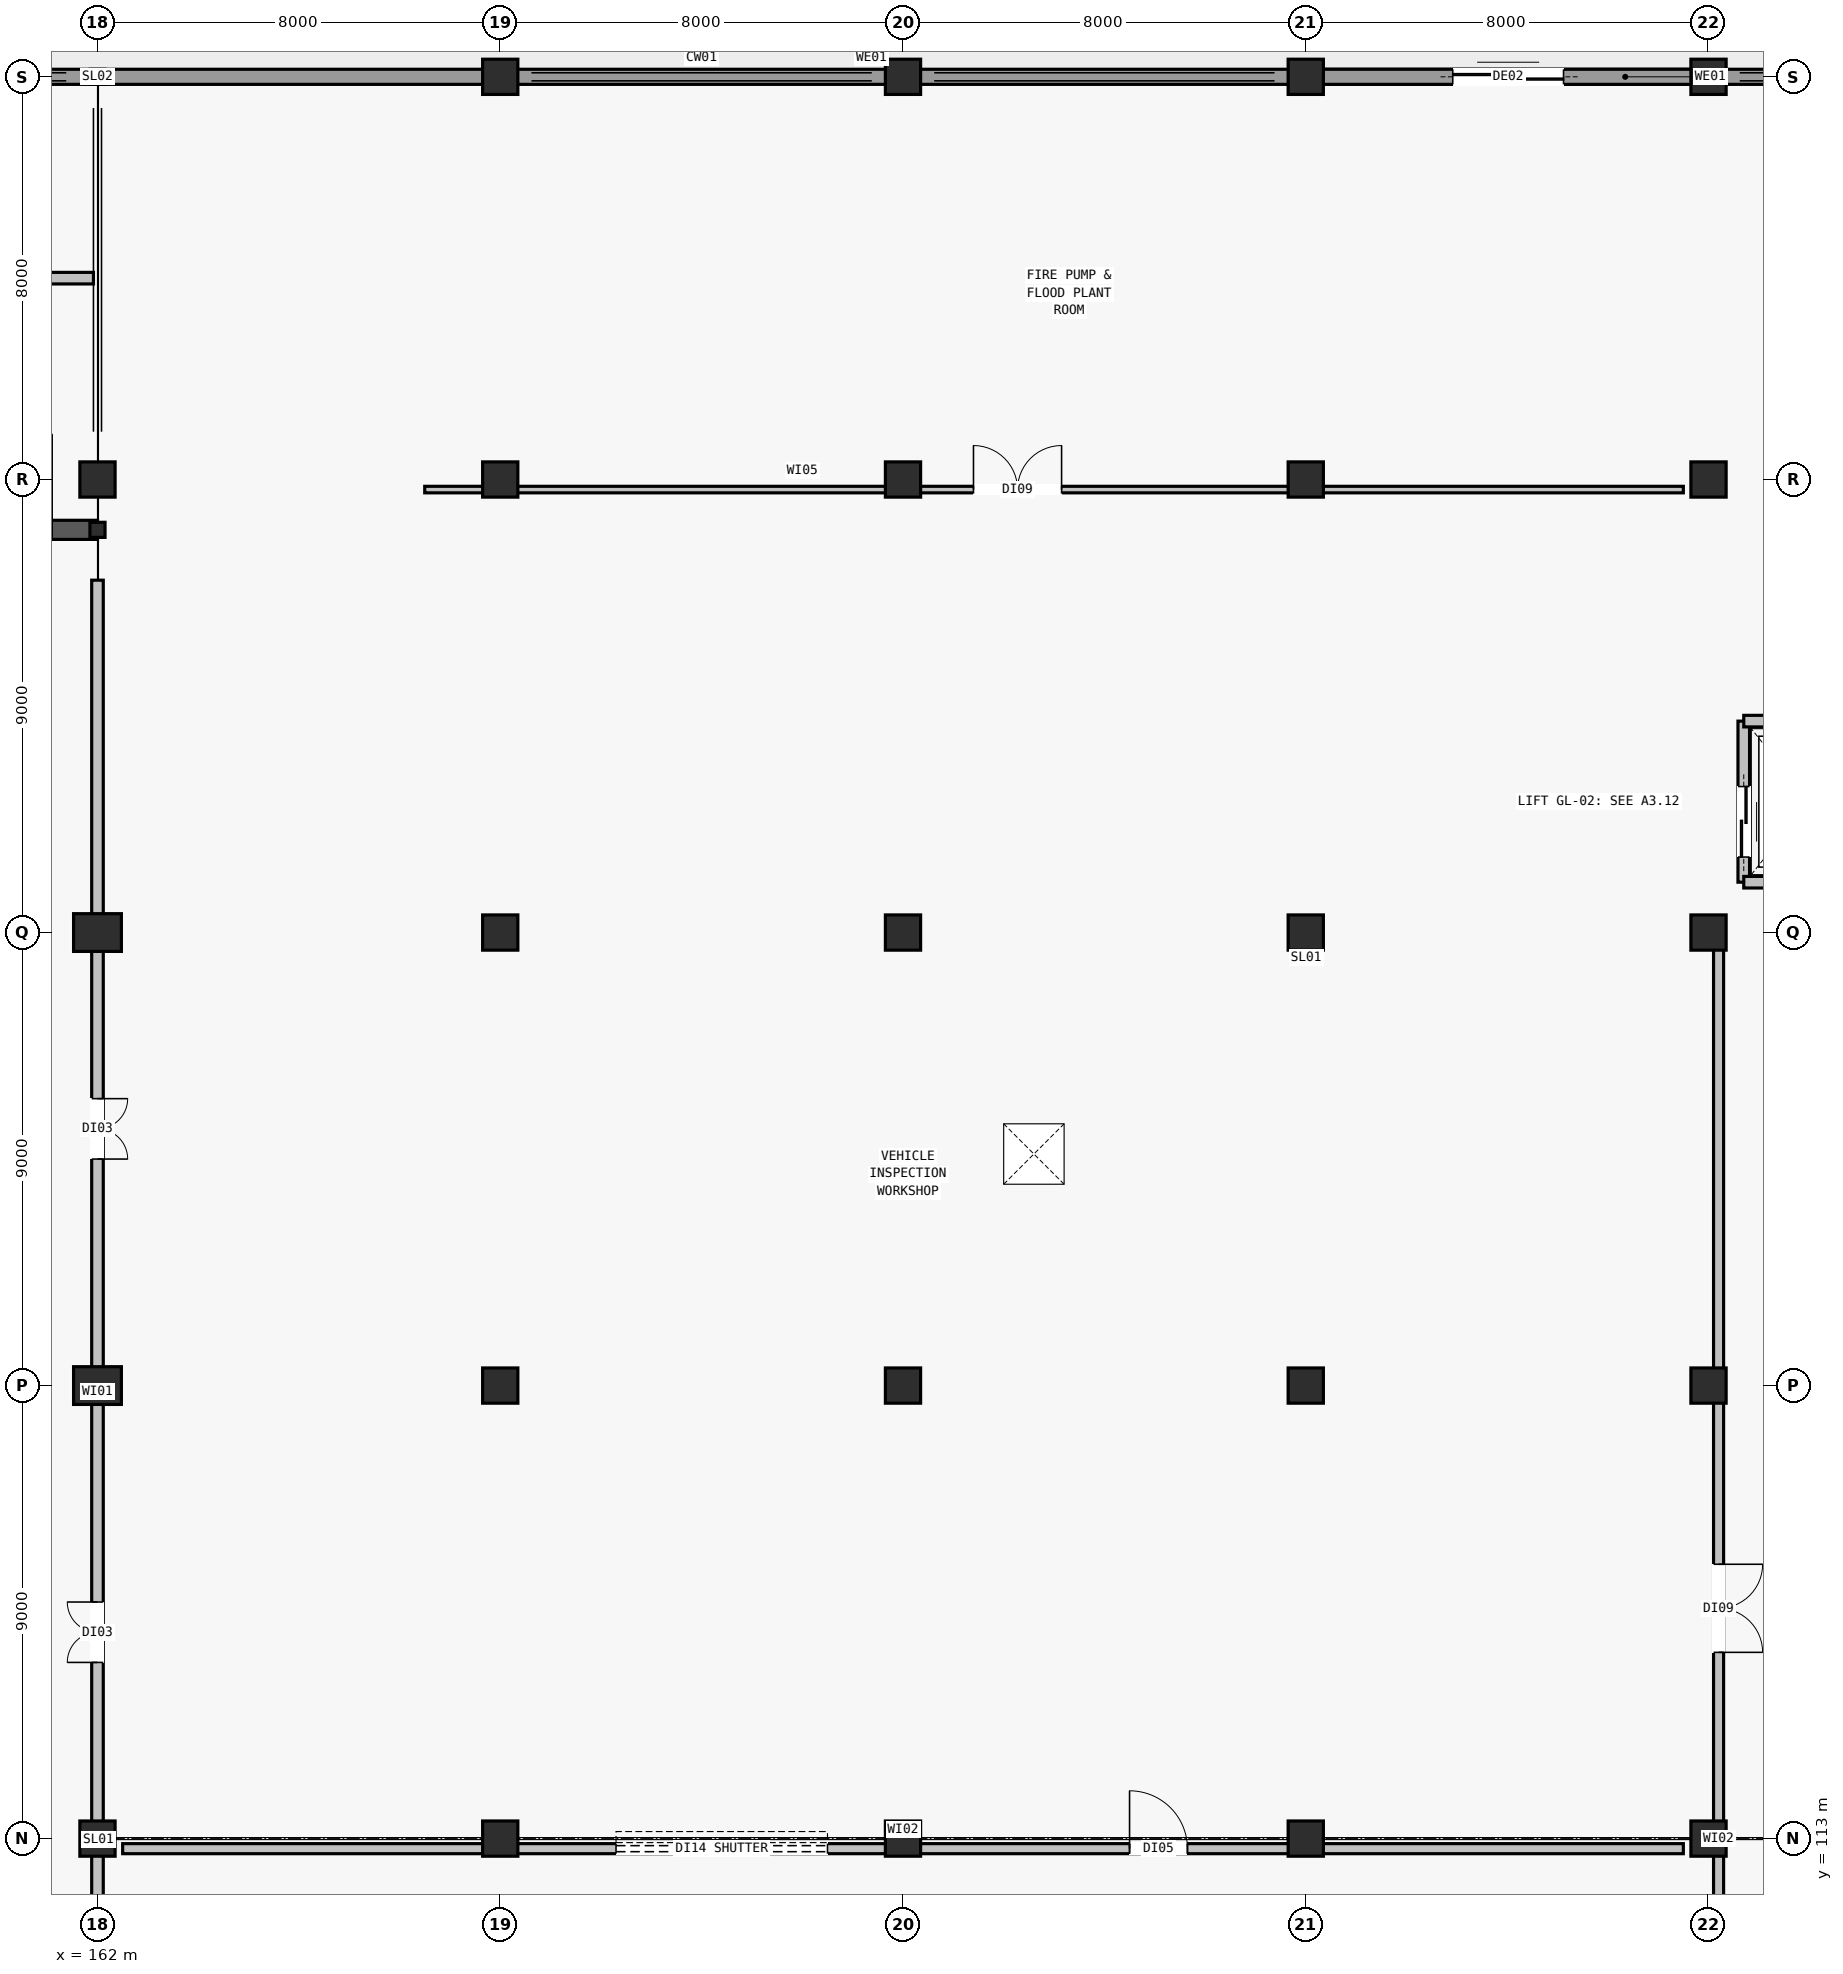
"""IFC4 building model, lengths in metres.
Left out: names, types, materials, properties, quantities, classifications, styles, units other than length and angle.
Written with IfcOpenShell. Run it as: python <this file> out.ifc"""

import sys

from ifc_helpers import new_model, si_unit, direction, frame, frame_2d, origin, origin_2d, place, context, subcontext, project, spatial, rectangle, i_section, extrude, element, fill, save


model = new_model("IFC4")
c1 = context("Model", 3, precision=1e-05, world=origin(), true_north=direction((0.0, 1.0)))
c2 = subcontext(c1, "Body", "Model", "MODEL_VIEW")
j1 = project(units=[si_unit("LENGTHUNIT", "METRE"), si_unit("PLANEANGLEUNIT", "RADIAN")], contexts=[c1])
p1 = place(None, origin())
s1 = spatial("IfcSite", under=j1, at=p1, CompositionType="ELEMENT")
p2 = place(p1, origin())
s2 = spatial("IfcBuilding", under=s1, at=p2, CompositionType="ELEMENT")
p3 = place(p2, origin())
s3 = spatial("IfcBuildingStorey", under=s2, at=p3, CompositionType="ELEMENT", Elevation=0.0)
for number, where, z_axis, x_axis in (
    (1, (162.0, 148.0, -0.9), (0.0, 0.0, 1.0), (1.0, 0.0, 0.0)),
    (2, (162.0, 139.0, -0.9), (0.0, 0.0, 1.0), (1.0, 0.0, 0.0)),
):
    element("IfcColumn", number, at=place(p3, frame(where, z_axis=z_axis, x_axis=x_axis)), inside=s3, PredefinedType="COLUMN", context=c2, shape_type="SweptSolid", body=[
        extrude(i_section(OverallWidth=0.3, OverallDepth=0.3, WebThickness=0.01, FlangeThickness=0.015, FilletRadius=0.018, at=origin_2d()), origin(), (0.0, 0.0, 1.0), 6.5),
    ])
for number, where, z_axis, x_axis in (
    (3, (162.0, 122.0, -0.9), (0.0, 0.0, 1.0), (1.0, 0.0, 0.0)),
    (4, (162.0, 131.0, -0.9), (0.0, 0.0, 1.0), (1.0, 0.0, 0.0)),
):
    element("IfcColumn", number, at=place(p3, frame(where, z_axis=z_axis, x_axis=x_axis)), inside=s3, PredefinedType="COLUMN", context=c2, shape_type="SweptSolid", body=[
        extrude(rectangle(XDim=0.95, YDim=0.75, at=origin_2d()), origin(), (0.0, 0.0, 1.0), 6.5),
    ])
for number, where, z_axis, x_axis in (
    (5, (162.0, 113.0, -0.9), (0.0, 0.0, 1.0), (1.0, 0.0, 0.0)),
    (6, (162.0, 140.0, -0.9), (0.0, 0.0, 1.0), (1.0, 0.0, 0.0)),
    (7, (170.0, 113.0, -0.9), (0.0, 0.0, 1.0), (1.0, 0.0, 0.0)),
    (8, (170.0, 122.0, -0.9), (0.0, 0.0, 1.0), (1.0, 0.0, 0.0)),
    (9, (170.0, 131.0, -0.9), (0.0, 0.0, 1.0), (1.0, 0.0, 0.0)),
    (10, (170.0, 140.0, -0.9), (0.0, 0.0, 1.0), (1.0, 0.0, 0.0)),
    (11, (170.0, 148.0, -0.9), (0.0, 0.0, 1.0), (1.0, 0.0, 0.0)),
    (12, (178.0, 113.0, -0.9), (0.0, 0.0, 1.0), (1.0, 0.0, 0.0)),
    (13, (178.0, 122.0, -0.9), (0.0, 0.0, 1.0), (1.0, 0.0, 0.0)),
    (14, (178.0, 131.0, -0.9), (0.0, 0.0, 1.0), (1.0, 0.0, 0.0)),
    (15, (178.0, 140.0, -0.9), (0.0, 0.0, 1.0), (1.0, 0.0, 0.0)),
    (16, (178.0, 148.0, -0.9), (0.0, 0.0, 1.0), (1.0, 0.0, 0.0)),
    (17, (186.0, 113.0, -0.9), (0.0, 0.0, 1.0), (1.0, 0.0, 0.0)),
    (18, (186.0, 122.0, -0.9), (0.0, 0.0, 1.0), (1.0, 0.0, 0.0)),
    (19, (186.0, 131.0, -0.9), (0.0, 0.0, 1.0), (1.0, 0.0, 0.0)),
    (20, (186.0, 140.0, -0.9), (0.0, 0.0, 1.0), (1.0, 0.0, 0.0)),
    (21, (186.0, 148.0, -0.9), (0.0, 0.0, 1.0), (1.0, 0.0, 0.0)),
    (22, (194.0, 113.0, -0.9), (0.0, 0.0, 1.0), (1.0, 0.0, 0.0)),
    (23, (194.0, 122.0, -0.9), (0.0, 0.0, 1.0), (1.0, 0.0, 0.0)),
    (24, (194.0, 131.0, -0.9), (0.0, 0.0, 1.0), (1.0, 0.0, 0.0)),
    (25, (194.0, 140.0, -0.9), (0.0, 0.0, 1.0), (1.0, 0.0, 0.0)),
    (26, (194.0, 148.0, -0.9), (0.0, 0.0, 1.0), (1.0, 0.0, 0.0)),
):
    element("IfcColumn", number, at=place(p3, frame(where, z_axis=z_axis, x_axis=x_axis)), inside=s3, PredefinedType="COLUMN", context=c2, shape_type="SweptSolid", body=[
        extrude(rectangle(XDim=0.7, YDim=0.7, at=origin_2d()), origin(), (0.0, 0.0, 1.0), 6.5),
    ])
p4 = place(p3, frame((22.0, 148.0, -0.9), z_axis=(0.0, 0.0, 1.0), x_axis=(1.0, 0.0, 0.0)))
e27 = element("IfcWall", 27, at=p4, inside=s3, PredefinedType="STANDARD", context=c2, shape_type="SweptSolid", body=[
    extrude(rectangle(XDim=188.0, YDim=0.3, at=frame_2d((94.0, 0.0))), origin(), (0.0, 0.0, 1.0), 0.9),
])
p5 = place(p3, frame((193.665, 148.0, 0.0), z_axis=(0.0, 0.0, 1.0), x_axis=(-1.0, 0.0, 0.0)))
e28 = element("IfcWall", 28, at=p5, inside=s3, PredefinedType="STANDARD", context=c2, shape_type="SweptSolid", body=[
    extrude(rectangle(XDim=7.33, YDim=0.3, at=frame_2d((3.665, 0.0))), origin(), (0.0, 0.0, 1.0), 4.2),
])
p6 = place(p5, frame((2.545, 0.0, 0.0)))
e29 = element("IfcOpeningElement", 29, at=p6, cuts=e28, PredefinedType="OPENING", context=c2, shape_type="SweptSolid", body=[
    extrude(rectangle(XDim=2.2, YDim=2.4, at=frame_2d((1.1, 1.2))), frame((0.0, 0.16, 0.0), z_axis=(0.0, -1.0, 0.0), x_axis=(1.0, 0.0, 0.0)), (0.0, 0.0, 1.0), 0.32),
])
p7 = place(p3, frame((154.0, 139.0, -0.9), z_axis=(0.0, 0.0, 1.0), x_axis=(1.0, 0.0, 0.0)))
e30 = element("IfcWall", 30, at=p7, inside=s3, PredefinedType="SHEAR", context=c2, shape_type="SweptSolid", body=[
    extrude(rectangle(XDim=8.0, YDim=0.38, at=frame_2d((4.0, 0.0))), origin(), (0.0, 0.0, 1.0), 6.22),
])
p8 = place(p7, frame((5.2, 0.0, 0.9)))
e31 = element("IfcOpeningElement", 31, at=p8, cuts=e30, PredefinedType="OPENING", context=c2, shape_type="SweptSolid", body=[
    extrude(rectangle(XDim=1.9, YDim=2.3, at=frame_2d((0.95, 1.15))), frame((0.0, 0.2, 0.0), z_axis=(0.0, -1.0, 0.0), x_axis=(1.0, 0.0, 0.0)), (0.0, 0.0, 1.0), 0.4),
])
p9 = place(p3, frame((158.21, 144.0, 0.0), z_axis=(0.0, 0.0, 1.0), x_axis=(1.0, 0.0, 0.0)))
e32 = element("IfcWall", 32, at=p9, inside=s3, PredefinedType="PARTITIONING", context=c2, shape_type="SweptSolid", body=[
    extrude(rectangle(XDim=3.71, YDim=0.23, at=frame_2d((1.855, 0.0))), origin(), (0.0, 0.0, 1.0), 4.2),
])
p10 = place(p9, frame((1.1, 0.0, 0.0)))
e33 = element("IfcOpeningElement", 33, at=p10, cuts=e32, PredefinedType="OPENING", context=c2, shape_type="SweptSolid", body=[
    extrude(rectangle(XDim=0.95, YDim=2.1, at=frame_2d((0.475, 1.05))), frame((0.0, 0.125, 0.0), z_axis=(0.0, -1.0, 0.0), x_axis=(1.0, 0.0, 0.0)), (0.0, 0.0, 1.0), 0.25),
])
p11 = place(p3, frame((194.7, 132.0, 0.0), z_axis=(0.0, 0.0, 1.0), x_axis=(0.0, 1.0, 0.0)))
e34 = element("IfcWall", 34, at=p11, inside=s3, PredefinedType="PARTITIONING", context=c2, shape_type="SweptSolid", body=[
    extrude(rectangle(XDim=3.2, YDim=0.23, at=frame_2d((1.6, 0.0))), origin(), (0.0, 0.0, 1.0), 4.2),
])
p12 = place(p11, frame((0.5, 0.0, 0.0)))
e35 = element("IfcOpeningElement", 35, at=p12, cuts=e34, PredefinedType="OPENING", context=c2, shape_type="SweptSolid", body=[
    extrude(rectangle(XDim=1.4, YDim=2.3, at=frame_2d((0.7, 1.15))), frame((0.0, 0.125, 0.0), z_axis=(0.0, -1.0, 0.0), x_axis=(1.0, 0.0, 0.0)), (0.0, 0.0, 1.0), 0.25),
])
for number, where, z_axis, x_axis in (
    (36, (194.7, 135.2, 0.0), (0.0, 0.0, 1.0), (1.0, 0.0, 0.0)),
    (37, (197.3, 132.0, 0.0), (0.0, 0.0, 1.0), (-1.0, 0.0, 0.0)),
):
    element("IfcWall", number, at=place(p3, frame(where, z_axis=z_axis, x_axis=x_axis)), inside=s3, PredefinedType="PARTITIONING", context=c2, shape_type="SweptSolid", body=[
        extrude(rectangle(XDim=2.6, YDim=0.23, at=frame_2d((1.3, 0.0))), origin(), (0.0, 0.0, 1.0), 4.2),
    ])
p13 = place(p3, frame((162.0, 105.0, 0.0), z_axis=(0.0, 0.0, 1.0), x_axis=(0.0, 1.0, 0.0)))
e38 = element("IfcWall", 38, at=p13, inside=s3, PredefinedType="PARTITIONING", context=c2, shape_type="SweptSolid", body=[
    extrude(rectangle(XDim=33.0, YDim=0.23, at=frame_2d((16.5, 0.0))), origin(), (0.0, 0.0, 1.0), 4.2),
])
p14 = place(p13, frame((11.5, 0.0, 0.0)))
e39 = element("IfcOpeningElement", 39, at=p14, cuts=e38, PredefinedType="OPENING", context=c2, shape_type="SweptSolid", body=[
    extrude(rectangle(XDim=1.2, YDim=2.2, at=frame_2d((0.6, 1.1))), frame((0.0, 0.125, 0.0), z_axis=(0.0, -1.0, 0.0), x_axis=(1.0, 0.0, 0.0)), (0.0, 0.0, 1.0), 0.25),
])
p15 = place(p13, frame((21.5, 0.0, 0.0)))
e40 = element("IfcOpeningElement", 40, at=p15, cuts=e38, PredefinedType="OPENING", context=c2, shape_type="SweptSolid", body=[
    extrude(rectangle(XDim=1.2, YDim=2.2, at=frame_2d((0.6, 1.1))), frame((0.0, 0.125, 0.0), z_axis=(0.0, -1.0, 0.0), x_axis=(1.0, 0.0, 0.0)), (0.0, 0.0, 1.0), 0.25),
])
p16 = place(p3, frame((162.5, 112.8, 0.0), z_axis=(0.0, 0.0, 1.0), x_axis=(1.0, 0.0, 0.0)))
e41 = element("IfcWall", 41, at=p16, inside=s3, PredefinedType="PARTITIONING", context=c2, shape_type="SweptSolid", body=[
    extrude(rectangle(XDim=31.0, YDim=0.2, at=frame_2d((15.5, 0.0))), origin(), (0.0, 0.0, 1.0), 4.2),
])
p17 = place(p16, frame((9.8, 0.0, 0.0)))
e42 = element("IfcOpeningElement", 42, at=p17, cuts=e41, PredefinedType="OPENING", context=c2, shape_type="SweptSolid", body=[
    extrude(rectangle(XDim=4.2, YDim=3.4, at=frame_2d((2.1, 1.7))), frame((0.0, 0.11, 0.0), z_axis=(0.0, -1.0, 0.0), x_axis=(1.0, 0.0, 0.0)), (0.0, 0.0, 1.0), 0.22),
])
p18 = place(p16, frame((20.0, 0.0, 0.0)))
e43 = element("IfcOpeningElement", 43, at=p18, cuts=e41, PredefinedType="OPENING", context=c2, shape_type="SweptSolid", body=[
    extrude(rectangle(XDim=1.15, YDim=2.15, at=frame_2d((0.575, 1.075))), frame((0.0, 0.11, 0.0), z_axis=(0.0, -1.0, 0.0), x_axis=(1.0, 0.0, 0.0)), (0.0, 0.0, 1.0), 0.22),
])
p19 = place(p3, frame((194.2, 86.2, 0.0), z_axis=(0.0, 0.0, 1.0), x_axis=(0.0, 1.0, 0.0)))
e44 = element("IfcWall", 44, at=p19, inside=s3, PredefinedType="PARTITIONING", context=c2, shape_type="SweptSolid", body=[
    extrude(rectangle(XDim=45.0, YDim=0.2, at=frame_2d((22.5, 0.0))), origin(), (0.0, 0.0, 1.0), 4.2),
])
p20 = place(p19, frame((13.5, 0.0, 0.0)))
e45 = element("IfcOpeningElement", 45, at=p20, cuts=e44, PredefinedType="OPENING", context=c2, shape_type="SweptSolid", body=[
    extrude(rectangle(XDim=2.1, YDim=2.35, at=frame_2d((1.05, 1.175))), frame((0.0, 0.11, 0.0), z_axis=(0.0, -1.0, 0.0), x_axis=(1.0, 0.0, 0.0)), (0.0, 0.0, 1.0), 0.22),
])
p21 = place(p19, frame((30.5, 0.0, 0.0)))
e46 = element("IfcOpeningElement", 46, at=p21, cuts=e44, PredefinedType="OPENING", context=c2, shape_type="SweptSolid", body=[
    extrude(rectangle(XDim=1.75, YDim=2.25, at=frame_2d((0.875, 1.125))), frame((0.0, 0.11, 0.0), z_axis=(0.0, -1.0, 0.0), x_axis=(1.0, 0.0, 0.0)), (0.0, 0.0, 1.0), 0.22),
])
p22 = place(p3, frame((168.5, 139.8, 0.0), z_axis=(0.0, 0.0, 1.0), x_axis=(1.0, 0.0, 0.0)))
e47 = element("IfcWall", 47, at=p22, inside=s3, PredefinedType="PARTITIONING", context=c2, shape_type="SweptSolid", body=[
    extrude(rectangle(XDim=25.0, YDim=0.13, at=frame_2d((12.5, 0.0))), origin(), (0.0, 0.0, 1.0), 4.2),
])
p23 = place(p22, frame((10.9, 0.0, 0.0)))
e48 = element("IfcOpeningElement", 48, at=p23, cuts=e47, PredefinedType="OPENING", context=c2, shape_type="SweptSolid", body=[
    extrude(rectangle(XDim=1.75, YDim=2.25, at=frame_2d((0.875, 1.125))), frame((0.0, 0.075, 0.0), z_axis=(0.0, -1.0, 0.0), x_axis=(1.0, 0.0, 0.0)), (0.0, 0.0, 1.0), 0.15),
])
p24 = place(p6, origin())
e49 = element("IfcDoor", 49, at=p24, inside=s3, OperationType="SINGLE_SWING_LEFT", PredefinedType="DOOR", context=c2, shape_type="SweptSolid", body=[
    extrude(rectangle(XDim=2.2, YDim=2.4, at=frame_2d((1.1, 1.2))), frame((0.0, 0.025, 0.0), z_axis=(0.0, -1.0, 0.0), x_axis=(1.0, 0.0, 0.0)), (0.0, 0.0, 1.0), 0.05),
])
fill(e29, e49)
p25 = place(p12, origin())
e50 = element("IfcDoor", 50, at=p25, inside=s3, OperationType="SLIDING_TO_RIGHT", PredefinedType="DOOR", context=c2, shape_type="SweptSolid", body=[
    extrude(rectangle(XDim=1.4, YDim=2.3, at=frame_2d((0.7, 1.15))), frame((0.0, 0.025, 0.0), z_axis=(0.0, -1.0, 0.0), x_axis=(1.0, 0.0, 0.0)), (0.0, 0.0, 1.0), 0.05),
])
fill(e35, e50)
p26 = place(p14, origin())
e51 = element("IfcDoor", 51, at=p26, inside=s3, OperationType="DOUBLE_SWING_LEFT", PredefinedType="DOOR", context=c2, shape_type="SweptSolid", body=[
    extrude(rectangle(XDim=1.2, YDim=2.2, at=frame_2d((0.6, 1.1))), frame((0.0, 0.025, 0.0), z_axis=(0.0, -1.0, 0.0), x_axis=(1.0, 0.0, 0.0)), (0.0, 0.0, 1.0), 0.05),
])
fill(e39, e51)
p27 = place(p15, origin())
e52 = element("IfcDoor", 52, at=p27, inside=s3, OperationType="DOUBLE_SWING_RIGHT", PredefinedType="DOOR", context=c2, shape_type="SweptSolid", body=[
    extrude(rectangle(XDim=1.2, YDim=2.2, at=frame_2d((0.6, 1.1))), frame((0.0, 0.025, 0.0), z_axis=(0.0, -1.0, 0.0), x_axis=(1.0, 0.0, 0.0)), (0.0, 0.0, 1.0), 0.05),
])
fill(e40, e52)
p28 = place(p17, origin())
e53 = element("IfcDoor", 53, at=p28, inside=s3, OperationType="ROLLINGUP", PredefinedType="GATE", context=c2, shape_type="SweptSolid", body=[
    extrude(rectangle(XDim=4.2, YDim=3.4, at=frame_2d((2.1, 1.7))), frame((0.0, 0.025, 0.0), z_axis=(0.0, -1.0, 0.0), x_axis=(1.0, 0.0, 0.0)), (0.0, 0.0, 1.0), 0.05),
])
fill(e42, e53)
p29 = place(p18, origin())
e54 = element("IfcDoor", 54, at=p29, inside=s3, OperationType="SINGLE_SWING_LEFT", PredefinedType="DOOR", context=c2, shape_type="SweptSolid", body=[
    extrude(rectangle(XDim=1.15, YDim=2.15, at=frame_2d((0.575, 1.075))), frame((0.0, 0.025, 0.0), z_axis=(0.0, -1.0, 0.0), x_axis=(1.0, 0.0, 0.0)), (0.0, 0.0, 1.0), 0.05),
])
fill(e43, e54)
p30 = place(p21, origin())
e55 = element("IfcDoor", 55, at=p30, inside=s3, OperationType="DOUBLE_SWING_RIGHT", PredefinedType="DOOR", context=c2, shape_type="SweptSolid", body=[
    extrude(rectangle(XDim=1.75, YDim=2.25, at=frame_2d((0.875, 1.125))), frame((0.0, 0.025, 0.0), z_axis=(0.0, -1.0, 0.0), x_axis=(1.0, 0.0, 0.0)), (0.0, 0.0, 1.0), 0.05),
])
fill(e46, e55)
p31 = place(p23, origin())
e56 = element("IfcDoor", 56, at=p31, inside=s3, OperationType="DOUBLE_SWING_LEFT", PredefinedType="DOOR", context=c2, shape_type="SweptSolid", body=[
    extrude(rectangle(XDim=1.75, YDim=2.25, at=frame_2d((0.875, 1.125))), frame((0.0, 0.025, 0.0), z_axis=(0.0, -1.0, 0.0), x_axis=(1.0, 0.0, 0.0)), (0.0, 0.0, 1.0), 0.05),
])
fill(e48, e56)
save(model, sys.argv[1])
